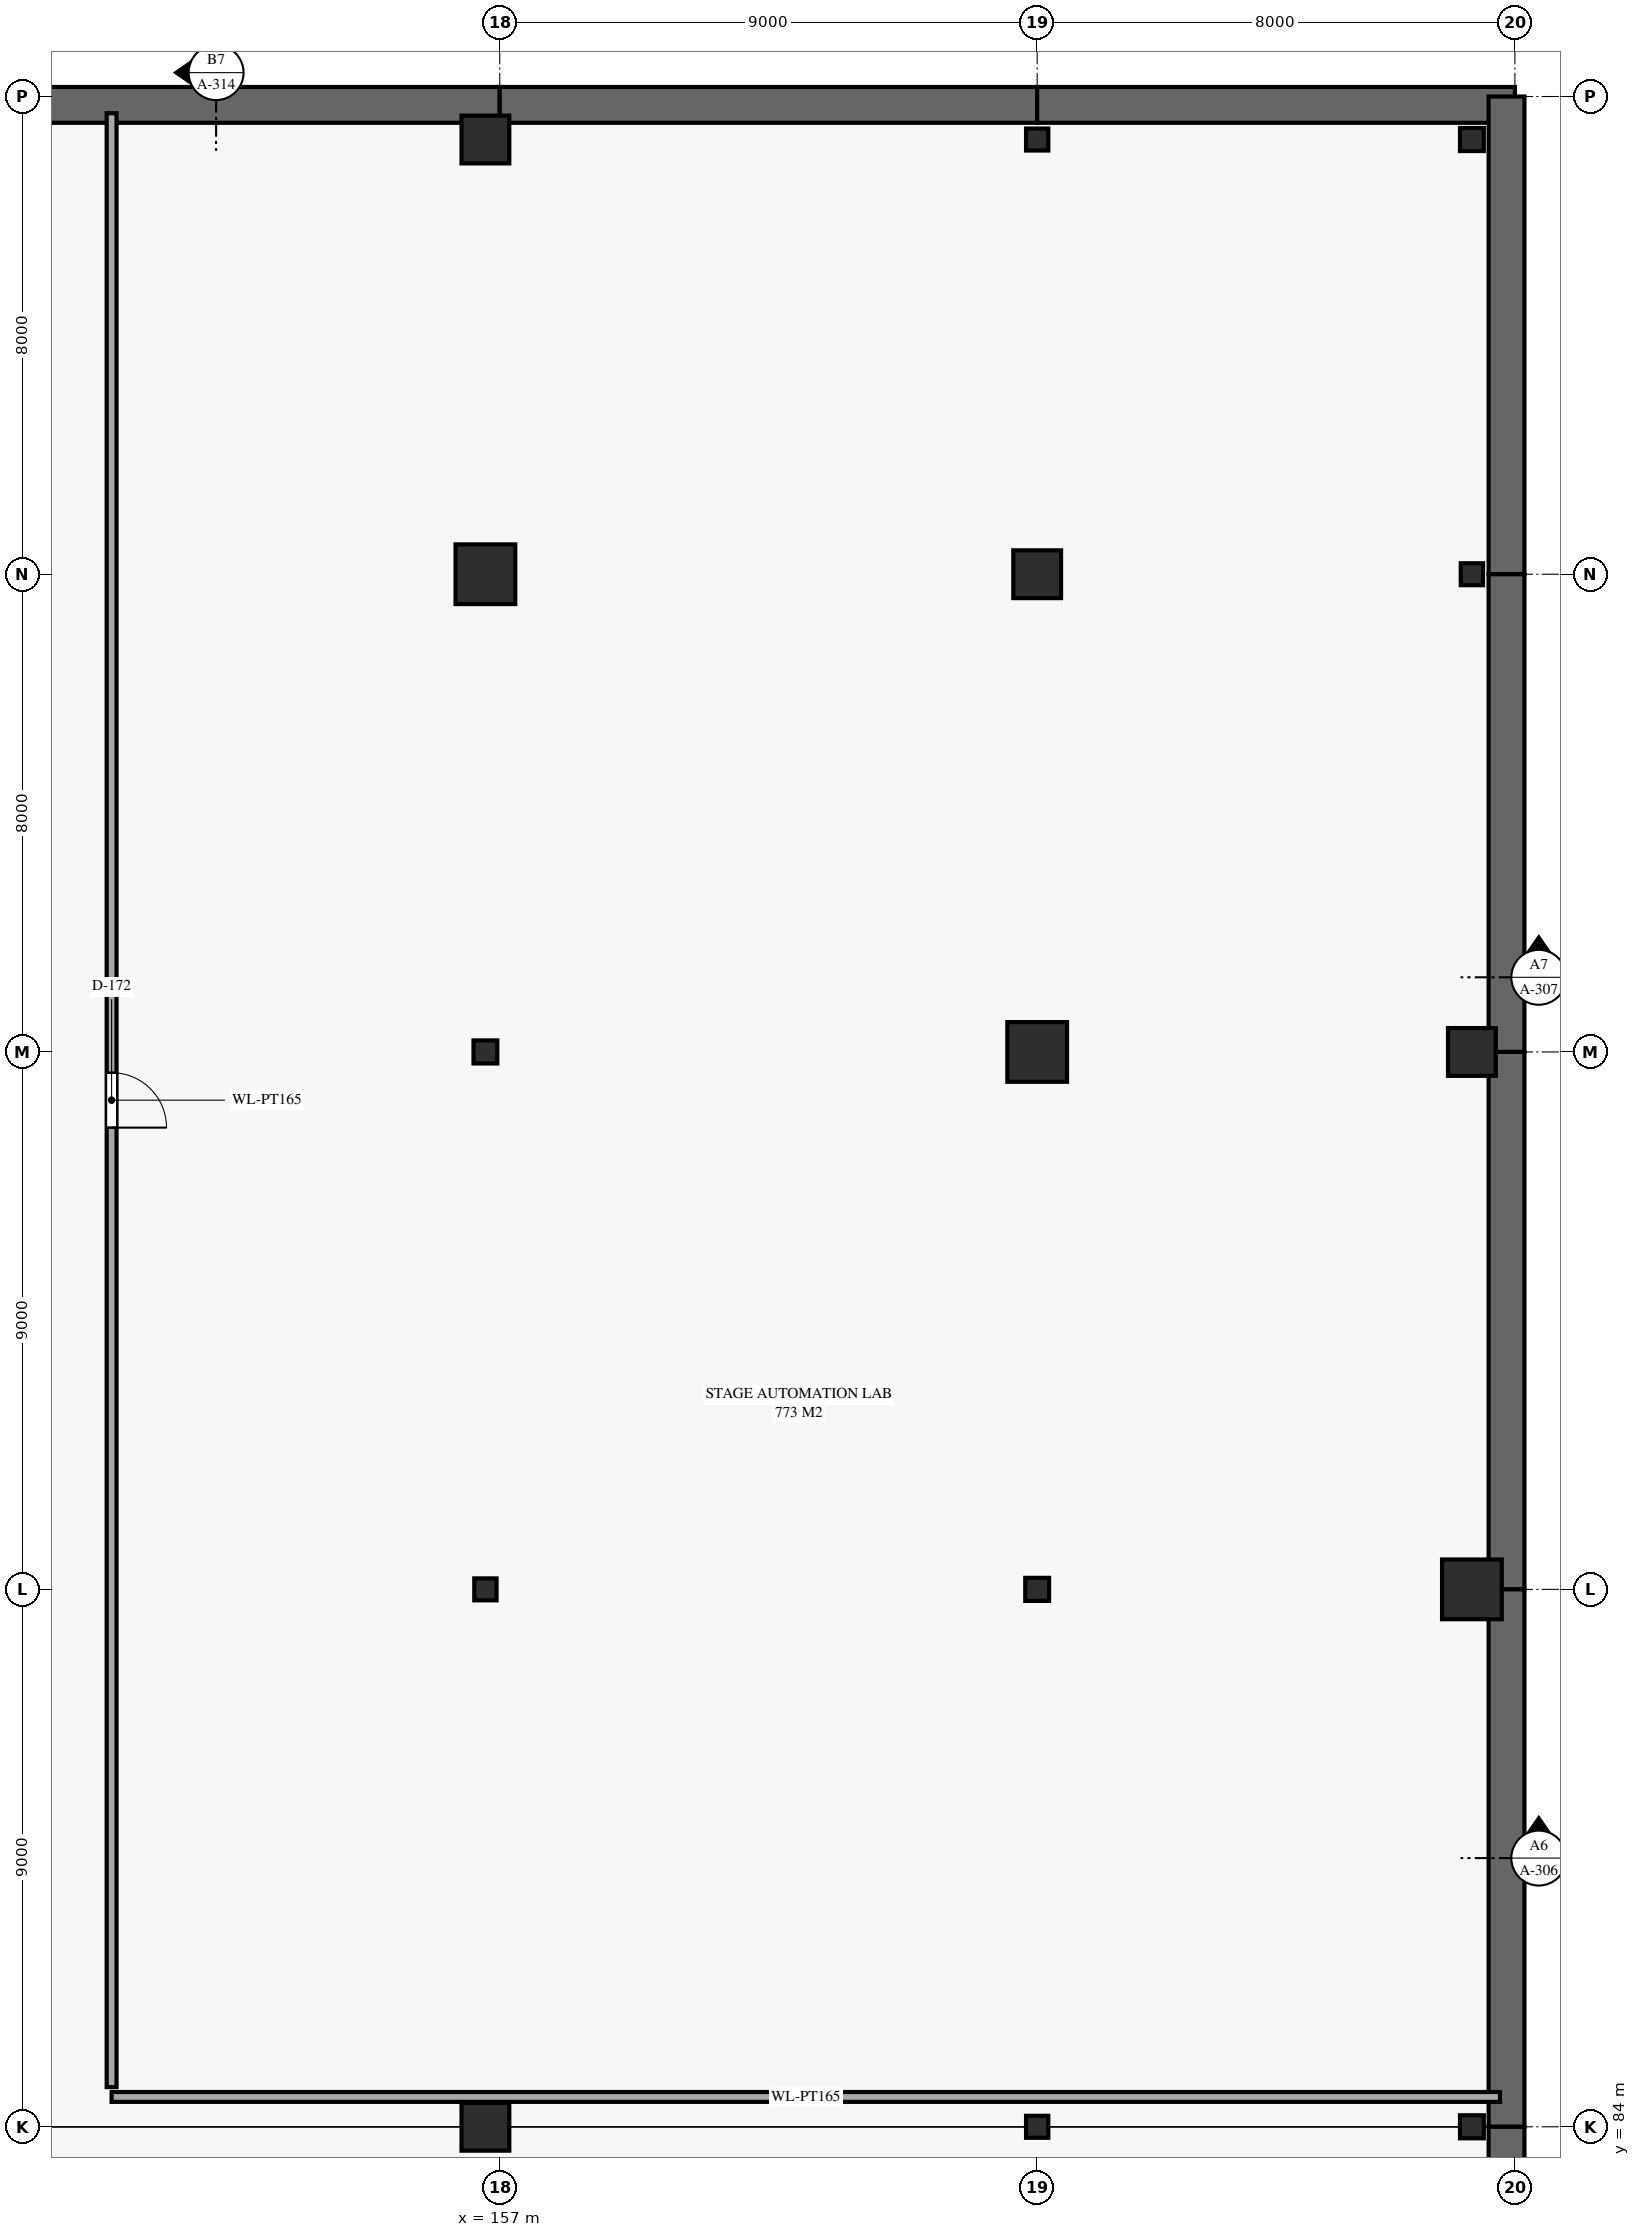
"""IFC4 building model, lengths in metres.
Left out: names, types, materials, properties, quantities, classifications, styles, units other than length and angle.
Written with IfcOpenShell. Run it as: python <this file> out.ifc"""

import sys

from ifc_helpers import new_model, si_unit, direction, frame, frame_2d, origin, origin_2d, place, context, subcontext, project, spatial, rectangle, i_section, extrude, element, fill, save


model = new_model("IFC4")
c1 = context("Model", 3, precision=1e-05, world=origin(), true_north=direction((0.0, 1.0)))
c2 = subcontext(c1, "Body", "Model", "MODEL_VIEW")
j1 = project(units=[si_unit("LENGTHUNIT", "METRE"), si_unit("PLANEANGLEUNIT", "RADIAN")], contexts=[c1])
p1 = place(None, origin())
s1 = spatial("IfcSite", under=j1, at=p1, CompositionType="ELEMENT")
p2 = place(p1, origin())
s2 = spatial("IfcBuilding", under=s1, at=p2, CompositionType="ELEMENT")
p3 = place(p2, frame((0.0, 0.0, -5.4)))
s3 = spatial("IfcBuildingStorey", under=s2, at=p3, CompositionType="ELEMENT", Elevation=-5.4)
p4 = place(p3, frame((156.76, 84.0, -0.6), z_axis=(0.0, 0.0, 1.0), x_axis=(1.0, 0.0, 0.0)))
e1 = element("IfcColumn", 1, at=p4, inside=s3, PredefinedType="COLUMN", context=c2, shape_type="SweptSolid", body=[
    extrude(rectangle(XDim=0.8, YDim=0.8, at=origin_2d()), origin(), (0.0, 0.0, 1.0), 6.0),
])
p5 = place(p3, frame((156.76, 93.0, -0.6), z_axis=(0.0, 0.0, 1.0), x_axis=(1.0, 0.0, 0.0)))
e2 = element("IfcColumn", 2, at=p5, inside=s3, PredefinedType="COLUMN", context=c2, shape_type="SweptSolid", body=[
    extrude(i_section(OverallWidth=0.373, OverallDepth=0.368, WebThickness=0.015, FlangeThickness=0.024, FilletRadius=0.015, at=origin_2d()), origin(), (0.0, 0.0, 1.0), 6.0),
])
p6 = place(p3, frame((156.76, 102.0, -0.6), z_axis=(0.0, 0.0, 1.0), x_axis=(1.0, 0.0, 0.0)))
e3 = element("IfcColumn", 3, at=p6, inside=s3, PredefinedType="COLUMN", context=c2, shape_type="SweptSolid", body=[
    extrude(i_section(OverallWidth=0.399, OverallDepth=0.386, WebThickness=0.021, FlangeThickness=0.033, FilletRadius=0.016, at=origin_2d()), origin(), (0.0, 0.0, 1.0), 6.0),
])
p7 = place(p3, frame((156.76, 110.0, -0.6), z_axis=(0.0, 0.0, 1.0), x_axis=(1.0, 0.0, 0.0)))
e4 = element("IfcColumn", 4, at=p7, inside=s3, PredefinedType="COLUMN", context=c2, shape_type="SweptSolid", body=[
    extrude(rectangle(XDim=1.0, YDim=1.0, at=origin_2d()), origin(), (0.0, 0.0, 1.0), 6.0),
])
p8 = place(p3, frame((156.76, 117.28, -0.6), z_axis=(0.0, 0.0, 1.0), x_axis=(1.0, 0.0, 0.0)))
e5 = element("IfcColumn", 5, at=p8, inside=s3, PredefinedType="COLUMN", context=c2, shape_type="SweptSolid", body=[
    extrude(rectangle(XDim=0.8, YDim=0.8, at=origin_2d()), origin(), (0.0, 0.0, 1.0), 6.0),
])
p9 = place(p3, frame((166.0, 84.0, -0.6), z_axis=(0.0, 0.0, 1.0), x_axis=(1.0, 0.0, 0.0)))
e6 = element("IfcColumn", 6, at=p9, inside=s3, PredefinedType="COLUMN", context=c2, shape_type="SweptSolid", body=[
    extrude(i_section(OverallWidth=0.373, OverallDepth=0.368, WebThickness=0.015, FlangeThickness=0.024, FilletRadius=0.015, at=origin_2d()), origin(), (0.0, 0.0, 1.0), 6.0),
])
p10 = place(p3, frame((166.0, 93.0, -0.6), z_axis=(0.0, 0.0, 1.0), x_axis=(1.0, 0.0, 0.0)))
e7 = element("IfcColumn", 7, at=p10, inside=s3, PredefinedType="COLUMN", context=c2, shape_type="SweptSolid", body=[
    extrude(i_section(OverallWidth=0.399, OverallDepth=0.386, WebThickness=0.021, FlangeThickness=0.033, FilletRadius=0.016, at=origin_2d()), origin(), (0.0, 0.0, 1.0), 6.0),
])
p11 = place(p3, frame((166.0, 102.0, -0.6), z_axis=(0.0, 0.0, 1.0), x_axis=(1.0, 0.0, 0.0)))
e8 = element("IfcColumn", 8, at=p11, inside=s3, PredefinedType="COLUMN", context=c2, shape_type="SweptSolid", body=[
    extrude(rectangle(XDim=1.0, YDim=1.0, at=origin_2d()), origin(), (0.0, 0.0, 1.0), 6.0),
])
p12 = place(p3, frame((166.0, 110.0, -0.6), z_axis=(0.0, 0.0, 1.0), x_axis=(1.0, 0.0, 0.0)))
e9 = element("IfcColumn", 9, at=p12, inside=s3, PredefinedType="COLUMN", context=c2, shape_type="SweptSolid", body=[
    extrude(rectangle(XDim=0.8, YDim=0.8, at=origin_2d()), origin(), (0.0, 0.0, 1.0), 6.0),
])
p13 = place(p3, frame((166.0, 117.28, -0.6), z_axis=(0.0, 0.0, 1.0), x_axis=(1.0, 0.0, 0.0)))
e10 = element("IfcColumn", 10, at=p13, inside=s3, PredefinedType="COLUMN", context=c2, shape_type="SweptSolid", body=[
    extrude(i_section(OverallWidth=0.373, OverallDepth=0.368, WebThickness=0.015, FlangeThickness=0.024, FilletRadius=0.015, at=origin_2d()), origin(), (0.0, 0.0, 1.0), 6.0),
])
p14 = place(p3, frame((173.28, 84.0, -0.6), z_axis=(0.0, 0.0, 1.0), x_axis=(1.0, 0.0, 0.0)))
e11 = element("IfcColumn", 11, at=p14, inside=s3, PredefinedType="COLUMN", context=c2, shape_type="SweptSolid", body=[
    extrude(i_section(OverallWidth=0.399, OverallDepth=0.386, WebThickness=0.021, FlangeThickness=0.033, FilletRadius=0.016, at=origin_2d()), origin(), (0.0, 0.0, 1.0), 6.0),
])
p15 = place(p3, frame((173.28, 93.0, -0.6), z_axis=(0.0, 0.0, 1.0), x_axis=(1.0, 0.0, 0.0)))
e12 = element("IfcColumn", 12, at=p15, inside=s3, PredefinedType="COLUMN", context=c2, shape_type="SweptSolid", body=[
    extrude(rectangle(XDim=1.0, YDim=1.0, at=origin_2d()), origin(), (0.0, 0.0, 1.0), 6.0),
])
p16 = place(p3, frame((173.28, 102.0, -0.6), z_axis=(0.0, 0.0, 1.0), x_axis=(1.0, 0.0, 0.0)))
e13 = element("IfcColumn", 13, at=p16, inside=s3, PredefinedType="COLUMN", context=c2, shape_type="SweptSolid", body=[
    extrude(rectangle(XDim=0.8, YDim=0.8, at=origin_2d()), origin(), (0.0, 0.0, 1.0), 6.0),
])
p17 = place(p3, frame((173.28, 110.0, -0.6), z_axis=(0.0, 0.0, 1.0), x_axis=(1.0, 0.0, 0.0)))
e14 = element("IfcColumn", 14, at=p17, inside=s3, PredefinedType="COLUMN", context=c2, shape_type="SweptSolid", body=[
    extrude(i_section(OverallWidth=0.373, OverallDepth=0.368, WebThickness=0.015, FlangeThickness=0.024, FilletRadius=0.015, at=origin_2d()), origin(), (0.0, 0.0, 1.0), 6.0),
])
p18 = place(p3, frame((173.28, 117.28, -0.6), z_axis=(0.0, 0.0, 1.0), x_axis=(1.0, 0.0, 0.0)))
e15 = element("IfcColumn", 15, at=p18, inside=s3, PredefinedType="COLUMN", context=c2, shape_type="SweptSolid", body=[
    extrude(i_section(OverallWidth=0.399, OverallDepth=0.386, WebThickness=0.021, FlangeThickness=0.033, FilletRadius=0.016, at=origin_2d()), origin(), (0.0, 0.0, 1.0), 6.0),
])
for number, where, z_axis, x_axis in (
    (16, (148.0, 117.86, 0.0), (0.0, 0.0, 1.0), (1.0, 0.0, 0.0)),
    (17, (157.0, 117.86, 0.0), (0.0, 0.0, 1.0), (1.0, 0.0, 0.0)),
):
    element("IfcWall", number, at=place(p3, frame(where, z_axis=z_axis, x_axis=x_axis)), inside=s3, PredefinedType="USERDEFINED", context=c2, shape_type="SweptSolid", body=[
        extrude(rectangle(XDim=9.0, YDim=0.6, at=frame_2d((4.5, 0.0))), origin(), (0.0, 0.0, 1.0), 5.02),
    ])
for number, where, z_axis, x_axis in (
    (18, (166.0, 117.86, 0.0), (0.0, 0.0, 1.0), (1.0, 0.0, 0.0)),
    (19, (173.86, 118.0, 0.0), (0.0, 0.0, 1.0), (0.0, -1.0, 0.0)),
    (20, (173.86, 110.0, 0.0), (0.0, 0.0, 1.0), (0.0, -1.0, 0.0)),
):
    element("IfcWall", number, at=place(p3, frame(where, z_axis=z_axis, x_axis=x_axis)), inside=s3, PredefinedType="USERDEFINED", context=c2, shape_type="SweptSolid", body=[
        extrude(rectangle(XDim=8.0, YDim=0.6, at=frame_2d((4.0, 0.0))), origin(), (0.0, 0.0, 1.0), 5.02),
    ])
for number, where, z_axis, x_axis in (
    (21, (173.86, 102.0, 0.0), (0.0, 0.0, 1.0), (0.0, -1.0, 0.0)),
    (22, (173.86, 93.0, 0.0), (0.0, 0.0, 1.0), (0.0, -1.0, 0.0)),
):
    element("IfcWall", number, at=place(p3, frame(where, z_axis=z_axis, x_axis=x_axis)), inside=s3, PredefinedType="USERDEFINED", context=c2, shape_type="SweptSolid", body=[
        extrude(rectangle(XDim=9.0, YDim=0.6, at=frame_2d((4.5, 0.0))), origin(), (0.0, 0.0, 1.0), 5.02),
    ])
p19 = place(p3, frame((173.86, 84.0, 0.0), z_axis=(0.0, 0.0, 1.0), x_axis=(0.0, -1.0, 0.0)))
e23 = element("IfcWall", 23, at=p19, inside=s3, PredefinedType="USERDEFINED", context=c2, shape_type="SweptSolid", body=[
    extrude(rectangle(XDim=10.0, YDim=0.6, at=frame_2d((5.0, 0.0))), origin(), (0.0, 0.0, 1.0), 5.02),
])
p20 = place(p3, frame((150.5, 84.5, 0.0), z_axis=(0.0, 0.0, 1.0), x_axis=(1.0, 0.0, 0.0)))
e24 = element("IfcWall", 24, at=p20, inside=s3, PredefinedType="PARTITIONING", context=c2, shape_type="SweptSolid", body=[
    extrude(rectangle(XDim=23.25, YDim=0.165, at=frame_2d((11.625, 0.0))), origin(), (0.0, 0.0, 1.0), 5.02),
])
p21 = place(p3, frame((150.5, 117.72, 0.0), z_axis=(0.0, 0.0, 1.0), x_axis=(0.0, -1.0, 0.0)))
e25 = element("IfcWall", 25, at=p21, inside=s3, PredefinedType="PARTITIONING", context=c2, shape_type="SweptSolid", body=[
    extrude(rectangle(XDim=33.055, YDim=0.165, at=frame_2d((16.527, 0.0))), origin(), (0.0, 0.0, 1.0), 4.543),
])
p22 = place(p21, frame((16.067, 0.0, 0.0)))
e26 = element("IfcOpeningElement", 26, at=p22, cuts=e25, PredefinedType="OPENING", context=c2, shape_type="SweptSolid", body=[
    extrude(rectangle(XDim=0.92, YDim=2.15, at=frame_2d((0.46, 1.075))), frame((0.0, 0.093, 0.0), z_axis=(0.0, -1.0, 0.0), x_axis=(1.0, 0.0, 0.0)), (0.0, 0.0, 1.0), 0.185),
])
p23 = place(p22, origin())
e27 = element("IfcDoor", 27, at=p23, inside=s3, OperationType="SINGLE_SWING_RIGHT", PredefinedType="DOOR", context=c2, shape_type="SweptSolid", body=[
    extrude(rectangle(XDim=0.92, YDim=2.15, at=frame_2d((0.46, 1.075))), frame((0.0, 0.025, 0.0), z_axis=(0.0, -1.0, 0.0), x_axis=(1.0, 0.0, 0.0)), (0.0, 0.0, 1.0), 0.05),
])
fill(e26, e27)
save(model, sys.argv[1])
